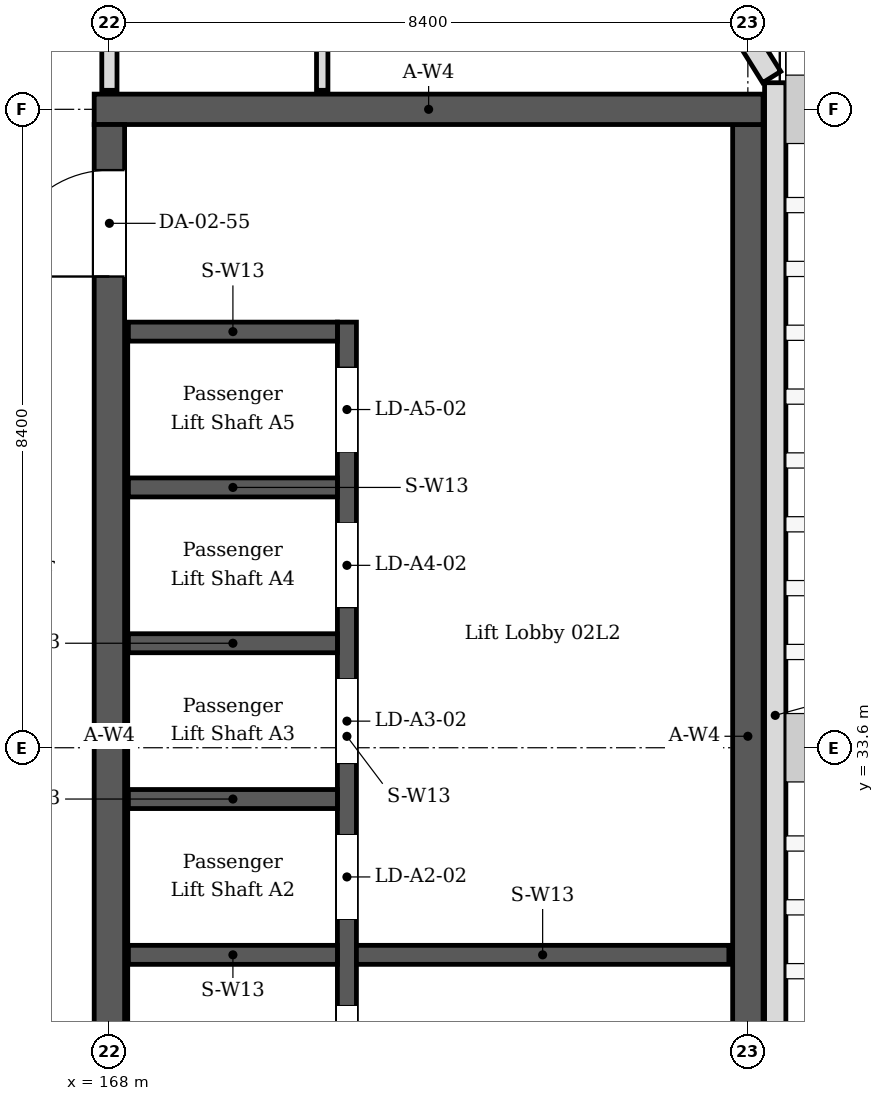
"""IFC4 building model, lengths in metres.
Left out: names, types, materials, properties, quantities, classifications, styles, units other than length and angle.
Written with IfcOpenShell. Run it as: python <this file> out.ifc"""

import sys

from ifc_helpers import new_model, si_unit, direction, frame, frame_2d, origin, place, context, subcontext, project, spatial, rectangle, extrude, element, fill, save


model = new_model("IFC4")
c1 = context("Model", 3, precision=1e-05, world=origin(), true_north=direction((0.0, 1.0)))
c2 = subcontext(c1, "Body", "Model", "MODEL_VIEW")
j1 = project(units=[si_unit("LENGTHUNIT", "METRE"), si_unit("PLANEANGLEUNIT", "RADIAN")], contexts=[c1])
p1 = place(None, origin())
s1 = spatial("IfcSite", under=j1, at=p1, CompositionType="ELEMENT")
p2 = place(p1, origin())
s2 = spatial("IfcBuilding", under=s1, at=p2, CompositionType="ELEMENT")
p3 = place(p2, frame((0.0, 0.0, 10.2)))
s3 = spatial("IfcBuildingStorey", under=s2, at=p3, CompositionType="ELEMENT", Elevation=10.2)
p4 = place(p3, frame((167.8, 42.0, 0.0), z_axis=(0.0, 0.0, 1.0), x_axis=(1.0, 0.0, 0.0)))
e1 = element("IfcWall", 1, at=p4, inside=s3, PredefinedType="SOLIDWALL", context=c2, shape_type="SweptSolid", body=[
    extrude(rectangle(XDim=8.8, YDim=0.4, at=frame_2d((4.4, 0.0))), origin(), (0.0, 0.0, 1.0), 4.05),
])
p5 = place(p3, frame((168.0, 25.4, 0.0), z_axis=(0.0, 0.0, 1.0), x_axis=(0.0, 1.0, 0.0)))
e2 = element("IfcWall", 2, at=p5, inside=s3, PredefinedType="SOLIDWALL", context=c2, shape_type="SweptSolid", body=[
    extrude(rectangle(XDim=16.4, YDim=0.4, at=frame_2d((8.2, 0.0))), origin(), (0.0, 0.0, 1.0), 4.05),
])
p6 = place(p5, frame((1.0, 0.0, 0.0)))
e3 = element("IfcOpeningElement", 3, at=p6, cuts=e2, PredefinedType="OPENING", context=c2, shape_type="SweptSolid", body=[
    extrude(rectangle(XDim=1.0, YDim=2.1, at=frame_2d((0.5, 1.05))), frame((0.0, 0.21, 0.0), z_axis=(0.0, -1.0, 0.0), x_axis=(1.0, 0.0, 0.0)), (0.0, 0.0, 1.0), 0.42),
])
p7 = place(p5, frame((14.4, 0.0, 0.0)))
e4 = element("IfcOpeningElement", 4, at=p7, cuts=e2, PredefinedType="OPENING", context=c2, shape_type="SweptSolid", body=[
    extrude(rectangle(XDim=1.4, YDim=2.1, at=frame_2d((0.7, 1.05))), frame((0.0, 0.21, 0.0), z_axis=(0.0, -1.0, 0.0), x_axis=(1.0, 0.0, 0.0)), (0.0, 0.0, 1.0), 0.42),
])
p8 = place(p3, frame((176.4, 25.4, 0.0), z_axis=(0.0, 0.0, 1.0), x_axis=(0.0, 1.0, 0.0)))
e5 = element("IfcWall", 5, at=p8, inside=s3, PredefinedType="SOLIDWALL", context=c2, shape_type="SweptSolid", body=[
    extrude(rectangle(XDim=16.4, YDim=0.4, at=frame_2d((8.2, 0.0))), origin(), (0.0, 0.0, 1.0), 4.05),
])
p9 = place(p3, frame((176.76, -0.22, 0.0), z_axis=(0.0, 0.0, 1.0), x_axis=(0.0, 1.0, 0.0)))
e6 = element("IfcWall", 6, at=p9, inside=s3, PredefinedType="SOLIDWALL", context=c2, shape_type="SweptSolid", body=[
    extrude(rectangle(XDim=42.57, YDim=0.28, at=frame_2d((21.285, 0.0))), origin(), (0.0, 0.0, 1.0), 4.05),
])
p10 = place(p9, frame((9.46, 0.0, 0.6)))
e7 = element("IfcOpeningElement", 7, at=p10, cuts=e6, PredefinedType="OPENING", context=c2, shape_type="SweptSolid", body=[
    extrude(rectangle(XDim=2.52, YDim=2.4, at=frame_2d((1.26, 1.2))), frame((0.0, 0.15, 0.0), z_axis=(0.0, -1.0, 0.0), x_axis=(1.0, 0.0, 0.0)), (0.0, 0.0, 1.0), 0.3),
])
p11 = place(p9, frame((13.66, 0.0, 0.6)))
e8 = element("IfcOpeningElement", 8, at=p11, cuts=e6, PredefinedType="OPENING", context=c2, shape_type="SweptSolid", body=[
    extrude(rectangle(XDim=2.52, YDim=2.4, at=frame_2d((1.26, 1.2))), frame((0.0, 0.15, 0.0), z_axis=(0.0, -1.0, 0.0), x_axis=(1.0, 0.0, 0.0)), (0.0, 0.0, 1.0), 0.3),
])
p12 = place(p9, frame((17.86, 0.0, 0.6)))
e9 = element("IfcOpeningElement", 9, at=p12, cuts=e6, PredefinedType="OPENING", context=c2, shape_type="SweptSolid", body=[
    extrude(rectangle(XDim=2.52, YDim=2.4, at=frame_2d((1.26, 1.2))), frame((0.0, 0.15, 0.0), z_axis=(0.0, -1.0, 0.0), x_axis=(1.0, 0.0, 0.0)), (0.0, 0.0, 1.0), 0.3),
])
p13 = place(p9, frame((22.06, 0.0, 0.6)))
e10 = element("IfcOpeningElement", 10, at=p13, cuts=e6, PredefinedType="OPENING", context=c2, shape_type="SweptSolid", body=[
    extrude(rectangle(XDim=2.52, YDim=2.4, at=frame_2d((1.26, 1.2))), frame((0.0, 0.15, 0.0), z_axis=(0.0, -1.0, 0.0), x_axis=(1.0, 0.0, 0.0)), (0.0, 0.0, 1.0), 0.3),
])
p14 = place(p3, frame((176.714, 42.424, 0.0), z_axis=(0.0, 0.0, 1.0), x_axis=(-0.529018946142, 0.848610013271, 0.0)))
e11 = element("IfcWall", 11, at=p14, inside=s3, PredefinedType="SOLIDWALL", context=c2, shape_type="SweptSolid", body=[
    extrude(rectangle(XDim=4.144, YDim=0.28, at=frame_2d((2.072, 0.0))), origin(), (0.0, 0.0, 1.0), 4.05),
])
p15 = place(p14, frame((0.812, 0.0, 0.6)))
e12 = element("IfcOpeningElement", 12, at=p15, cuts=e11, PredefinedType="OPENING", context=c2, shape_type="SweptSolid", body=[
    extrude(rectangle(XDim=2.52, YDim=2.4, at=frame_2d((1.26, 1.2))), frame((0.0, 0.15, 0.0), z_axis=(0.0, -1.0, 0.0), x_axis=(1.0, 0.0, 0.0)), (0.0, 0.0, 1.0), 0.3),
])
p16 = place(p3, frame((170.8, 42.25, 0.0), z_axis=(0.0, 0.0, 1.0), x_axis=(0.0, 1.0, 0.0)))
e13 = element("IfcWall", 13, at=p16, inside=s3, PredefinedType="PARTITIONING", context=c2, shape_type="SweptSolid", body=[
    extrude(rectangle(XDim=2.15, YDim=0.15, at=frame_2d((1.075, 0.0))), origin(), (0.0, 0.0, 1.0), 4.05),
])
p17 = place(p3, frame((168.0, 42.25, 0.0), z_axis=(0.0, 0.0, 1.0), x_axis=(0.0, 1.0, 0.0)))
e14 = element("IfcWall", 14, at=p17, inside=s3, PredefinedType="PARTITIONING", context=c2, shape_type="SweptSolid", body=[
    extrude(rectangle(XDim=7.943, YDim=0.2, at=frame_2d((3.972, 0.0))), origin(), (0.0, 0.0, 1.0), 3.45),
])
p18 = place(p17, frame((2.45, 0.0, 0.0)))
e15 = element("IfcOpeningElement", 15, at=p18, cuts=e14, PredefinedType="OPENING", context=c2, shape_type="SweptSolid", body=[
    extrude(rectangle(XDim=1.2, YDim=2.1, at=frame_2d((0.6, 1.05))), frame((0.0, 0.11, 0.0), z_axis=(0.0, -1.0, 0.0), x_axis=(1.0, 0.0, 0.0)), (0.0, 0.0, 1.0), 0.22),
])
p19 = place(p17, frame((4.25, 0.0, 0.0)))
e16 = element("IfcOpeningElement", 16, at=p19, cuts=e14, PredefinedType="OPENING", context=c2, shape_type="SweptSolid", body=[
    extrude(rectangle(XDim=1.2, YDim=2.1, at=frame_2d((0.6, 1.05))), frame((0.0, 0.11, 0.0), z_axis=(0.0, -1.0, 0.0), x_axis=(1.0, 0.0, 0.0)), (0.0, 0.0, 1.0), 0.22),
])
p20 = place(p3, frame((171.125, 28.3, 0.0), z_axis=(0.0, 0.0, 1.0), x_axis=(0.0, 1.0, 0.0)))
e17 = element("IfcWall", 17, at=p20, inside=s3, PredefinedType="SOLIDWALL", context=c2, shape_type="SweptSolid", body=[
    extrude(rectangle(XDim=10.9, YDim=0.25, at=frame_2d((5.45, 0.0))), origin(), (0.0, 0.0, 1.0), 4.05),
])
p21 = place(p20, frame((0.8, 0.0, 0.0)))
e18 = element("IfcOpeningElement", 18, at=p21, cuts=e17, PredefinedType="OPENING", context=c2, shape_type="SweptSolid", body=[
    extrude(rectangle(XDim=1.1, YDim=2.1, at=frame_2d((0.55, 1.05))), frame((0.0, 0.135, 0.0), z_axis=(0.0, -1.0, 0.0), x_axis=(1.0, 0.0, 0.0)), (0.0, 0.0, 1.0), 0.27),
])
p22 = place(p20, frame((3.05, 0.0, 0.0)))
e19 = element("IfcOpeningElement", 19, at=p22, cuts=e17, PredefinedType="OPENING", context=c2, shape_type="SweptSolid", body=[
    extrude(rectangle(XDim=1.1, YDim=2.1, at=frame_2d((0.55, 1.05))), frame((0.0, 0.135, 0.0), z_axis=(0.0, -1.0, 0.0), x_axis=(1.0, 0.0, 0.0)), (0.0, 0.0, 1.0), 0.27),
])
p23 = place(p20, frame((5.1, 0.0, 0.0)))
e20 = element("IfcOpeningElement", 20, at=p23, cuts=e17, PredefinedType="OPENING", context=c2, shape_type="SweptSolid", body=[
    extrude(rectangle(XDim=1.1, YDim=2.1, at=frame_2d((0.55, 1.05))), frame((0.0, 0.135, 0.0), z_axis=(0.0, -1.0, 0.0), x_axis=(1.0, 0.0, 0.0)), (0.0, 0.0, 1.0), 0.27),
])
p24 = place(p20, frame((7.15, 0.0, 0.0)))
e21 = element("IfcOpeningElement", 21, at=p24, cuts=e17, PredefinedType="OPENING", context=c2, shape_type="SweptSolid", body=[
    extrude(rectangle(XDim=1.1, YDim=2.1, at=frame_2d((0.55, 1.05))), frame((0.0, 0.135, 0.0), z_axis=(0.0, -1.0, 0.0), x_axis=(1.0, 0.0, 0.0)), (0.0, 0.0, 1.0), 0.27),
])
p25 = place(p20, frame((9.2, 0.0, 0.0)))
e22 = element("IfcOpeningElement", 22, at=p25, cuts=e17, PredefinedType="OPENING", context=c2, shape_type="SweptSolid", body=[
    extrude(rectangle(XDim=1.1, YDim=2.1, at=frame_2d((0.55, 1.05))), frame((0.0, 0.135, 0.0), z_axis=(0.0, -1.0, 0.0), x_axis=(1.0, 0.0, 0.0)), (0.0, 0.0, 1.0), 0.27),
])
for number, where, z_axis, x_axis in (
    (23, (168.25, 30.875, 0.0), (0.0, 0.0, 1.0), (1.0, 0.0, 0.0)),
    (24, (168.25, 32.925, 0.0), (0.0, 0.0, 1.0), (1.0, 0.0, 0.0)),
    (25, (168.25, 34.975, 0.0), (0.0, 0.0, 1.0), (1.0, 0.0, 0.0)),
    (26, (168.25, 37.025, 0.0), (0.0, 0.0, 1.0), (1.0, 0.0, 0.0)),
    (27, (168.25, 39.075, 0.0), (0.0, 0.0, 1.0), (1.0, 0.0, 0.0)),
):
    element("IfcWall", number, at=place(p3, frame(where, z_axis=z_axis, x_axis=x_axis)), inside=s3, PredefinedType="SOLIDWALL", context=c2, shape_type="SweptSolid", body=[
        extrude(rectangle(XDim=2.75, YDim=0.25, at=frame_2d((1.375, 0.0))), origin(), (0.0, 0.0, 1.0), 4.05),
    ])
p26 = place(p3, frame((171.25, 30.875, 0.0), z_axis=(0.0, 0.0, 1.0), x_axis=(1.0, 0.0, 0.0)))
e28 = element("IfcWall", 28, at=p26, inside=s3, PredefinedType="SOLIDWALL", context=c2, shape_type="SweptSolid", body=[
    extrude(rectangle(XDim=4.9, YDim=0.25, at=frame_2d((2.45, 0.0))), origin(), (0.0, 0.0, 1.0), 4.05),
])
p27 = place(p21, origin())
e29 = element("IfcDoor", 29, at=p27, inside=s3, OperationType="SLIDING_TO_LEFT", PredefinedType="DOOR", context=c2, shape_type="SweptSolid", body=[
    extrude(rectangle(XDim=1.1, YDim=2.1, at=frame_2d((0.55, 1.05))), frame((0.0, 0.025, 0.0), z_axis=(0.0, -1.0, 0.0), x_axis=(1.0, 0.0, 0.0)), (0.0, 0.0, 1.0), 0.05),
])
fill(e18, e29)
p28 = place(p22, origin())
e30 = element("IfcDoor", 30, at=p28, inside=s3, OperationType="SLIDING_TO_LEFT", PredefinedType="DOOR", context=c2, shape_type="SweptSolid", body=[
    extrude(rectangle(XDim=1.1, YDim=2.1, at=frame_2d((0.55, 1.05))), frame((0.0, 0.025, 0.0), z_axis=(0.0, -1.0, 0.0), x_axis=(1.0, 0.0, 0.0)), (0.0, 0.0, 1.0), 0.05),
])
fill(e19, e30)
p29 = place(p23, origin())
e31 = element("IfcDoor", 31, at=p29, inside=s3, OperationType="SLIDING_TO_LEFT", PredefinedType="DOOR", context=c2, shape_type="SweptSolid", body=[
    extrude(rectangle(XDim=1.1, YDim=2.1, at=frame_2d((0.55, 1.05))), frame((0.0, 0.025, 0.0), z_axis=(0.0, -1.0, 0.0), x_axis=(1.0, 0.0, 0.0)), (0.0, 0.0, 1.0), 0.05),
])
fill(e20, e31)
p30 = place(p24, origin())
e32 = element("IfcDoor", 32, at=p30, inside=s3, OperationType="SLIDING_TO_LEFT", PredefinedType="DOOR", context=c2, shape_type="SweptSolid", body=[
    extrude(rectangle(XDim=1.1, YDim=2.1, at=frame_2d((0.55, 1.05))), frame((0.0, 0.025, 0.0), z_axis=(0.0, -1.0, 0.0), x_axis=(1.0, 0.0, 0.0)), (0.0, 0.0, 1.0), 0.05),
])
fill(e21, e32)
p31 = place(p25, origin())
e33 = element("IfcDoor", 33, at=p31, inside=s3, OperationType="SLIDING_TO_LEFT", PredefinedType="DOOR", context=c2, shape_type="SweptSolid", body=[
    extrude(rectangle(XDim=1.1, YDim=2.1, at=frame_2d((0.55, 1.05))), frame((0.0, 0.025, 0.0), z_axis=(0.0, -1.0, 0.0), x_axis=(1.0, 0.0, 0.0)), (0.0, 0.0, 1.0), 0.05),
])
fill(e22, e33)
p32 = place(p7, origin())
e34 = element("IfcDoor", 34, at=p32, inside=s3, OperationType="DOUBLE_DOOR_DOUBLE_SWING", PredefinedType="DOOR", context=c2, shape_type="SweptSolid", body=[
    extrude(rectangle(XDim=1.4, YDim=2.1, at=frame_2d((0.7, 1.05))), frame((0.0, 0.025, 0.0), z_axis=(0.0, -1.0, 0.0), x_axis=(1.0, 0.0, 0.0)), (0.0, 0.0, 1.0), 0.05),
])
fill(e4, e34)
save(model, sys.argv[1])
